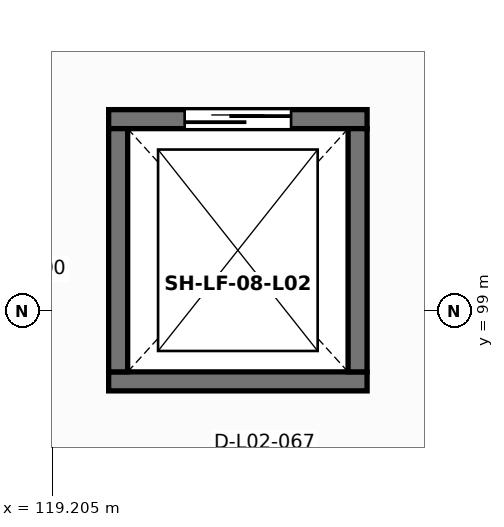
"""IFC4 building model, lengths in metres.
Left out: names, types, materials, properties, quantities, classifications, styles, units other than length and angle.
Written with IfcOpenShell. Run it as: python <this file> out.ifc"""

import sys

from ifc_helpers import new_model, si_unit, direction, frame, frame_2d, origin, place, context, subcontext, project, spatial, rectangle, extrude, element, fill, save


model = new_model("IFC4")
c1 = context("Model", 3, precision=1e-05, world=origin(), true_north=direction((0.0, 1.0)))
c2 = subcontext(c1, "Body", "Model", "MODEL_VIEW")
j1 = project(units=[si_unit("LENGTHUNIT", "METRE"), si_unit("PLANEANGLEUNIT", "RADIAN")], contexts=[c1])
p1 = place(None, origin())
s1 = spatial("IfcSite", under=j1, at=p1, CompositionType="ELEMENT")
p2 = place(p1, origin())
s2 = spatial("IfcBuilding", under=s1, at=p2, CompositionType="ELEMENT")
p3 = place(p2, frame((0.0, 0.0, 11.2)))
s3 = spatial("IfcBuildingStorey", under=s2, at=p3, CompositionType="ELEMENT", Elevation=11.2)
p4 = place(p3, frame((119.95, 98.075, 0.0), z_axis=(0.0, 0.0, 1.0), x_axis=(1.0, 0.0, 0.0)))
e1 = element("IfcWall", 1, at=p4, inside=s3, PredefinedType="SOLIDWALL", context=c2, shape_type="SweptSolid", body=[
    extrude(rectangle(XDim=3.4, YDim=0.25, at=frame_2d((1.7, 0.0))), origin(), (0.0, 0.0, 1.0), 2.3),
])
p5 = place(p3, frame((123.35, 101.525, 0.0), z_axis=(0.0, 0.0, 1.0), x_axis=(-1.0, 0.0, 0.0)))
e2 = element("IfcWall", 2, at=p5, inside=s3, PredefinedType="SOLIDWALL", context=c2, shape_type="SweptSolid", body=[
    extrude(rectangle(XDim=3.4, YDim=0.25, at=frame_2d((1.7, 0.0))), origin(), (0.0, 0.0, 1.0), 2.3),
])
p6 = place(p5, frame((1.0, 0.0, 0.0)))
e3 = element("IfcOpeningElement", 3, at=p6, cuts=e2, PredefinedType="OPENING", context=c2, shape_type="SweptSolid", body=[
    extrude(rectangle(XDim=1.4, YDim=2.25, at=frame_2d((0.7, 1.125))), frame((0.0, 0.135, 0.0), z_axis=(0.0, -1.0, 0.0), x_axis=(1.0, 0.0, 0.0)), (0.0, 0.0, 1.0), 0.27),
])
for number, where, z_axis, x_axis in (
    (4, (123.225, 98.2, 0.0), (0.0, 0.0, 1.0), (0.0, 1.0, 0.0)),
    (5, (120.075, 101.4, 0.0), (0.0, 0.0, 1.0), (0.0, -1.0, 0.0)),
):
    element("IfcWall", number, at=place(p3, frame(where, z_axis=z_axis, x_axis=x_axis)), inside=s3, PredefinedType="SOLIDWALL", context=c2, shape_type="SweptSolid", body=[
        extrude(rectangle(XDim=3.2, YDim=0.25, at=frame_2d((1.6, 0.0))), origin(), (0.0, 0.0, 1.0), 2.3),
    ])
p7 = place(p6, frame((1.4, 0.0, 0.0), z_axis=(0.0, 0.0, 1.0), x_axis=(-1.0, 0.0, 0.0)))
e6 = element("IfcDoor", 6, at=p7, inside=s3, OperationType="DOUBLE_DOOR_SLIDING", PredefinedType="DOOR", context=c2, shape_type="SweptSolid", body=[
    extrude(rectangle(XDim=1.4, YDim=2.25, at=frame_2d((0.7, 1.125))), frame((0.0, 0.025, 0.0), z_axis=(0.0, -1.0, 0.0), x_axis=(1.0, 0.0, 0.0)), (0.0, 0.0, 1.0), 0.05),
])
fill(e3, e6)
save(model, sys.argv[1])
